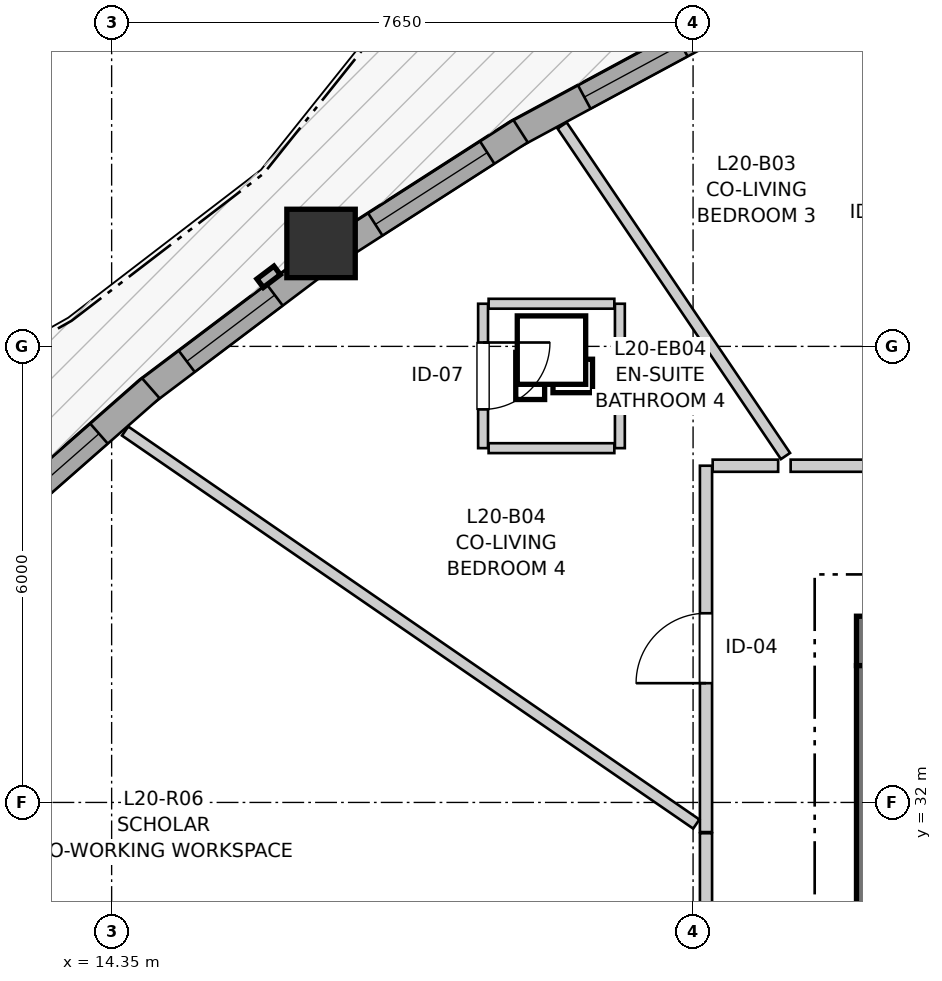
"""IFC4 building model, lengths in metres.
Left out: names, types, materials, properties, quantities, classifications, styles, units other than length and angle.
Written with IfcOpenShell. Run it as: python <this file> out.ifc"""

import sys

from ifc_helpers import new_model, si_unit, direction, frame, frame_2d, origin, origin_2d, place, context, subcontext, project, spatial, rectangle, extrude, source, transform, mapped, element, fill, save


model = new_model("IFC4")
c1 = context("Model", 3, precision=1e-05, world=origin(), true_north=direction((0.0, 1.0)))
c2 = subcontext(c1, "Body", "Model", "MODEL_VIEW")
j1 = project(units=[si_unit("LENGTHUNIT", "METRE"), si_unit("PLANEANGLEUNIT", "RADIAN")], contexts=[c1])
p1 = place(None, origin())
s1 = spatial("IfcSite", under=j1, at=p1, CompositionType="ELEMENT")
p2 = place(p1, origin())
s2 = spatial("IfcBuilding", under=s1, at=p2, CompositionType="ELEMENT")
p3 = place(p2, frame((0.0, 0.0, 70.4)))
s3 = spatial("IfcBuildingStorey", under=s2, at=p3, CompositionType="ELEMENT", Elevation=70.4)
p4 = place(p3, frame((36.55, 34.125, 0.0), z_axis=(0.0, 0.0, 1.0), x_axis=(-1.0, 0.0, 0.0)))
e1 = element("IfcWall", 1, at=p4, inside=s3, PredefinedType="SHEAR", context=c2, shape_type="SweptSolid", body=[
    extrude(rectangle(XDim=12.4, YDim=0.65, at=frame_2d((6.2, 0.0))), origin(), (0.0, 0.0, 1.0), 2.95),
])
p5 = place(p3, frame((24.475, 33.8, 0.0), z_axis=(0.0, 0.0, 1.0), x_axis=(0.0, -1.0, 0.0)))
e2 = element("IfcWall", 2, at=p5, inside=s3, PredefinedType="SHEAR", context=c2, shape_type="SweptSolid", body=[
    extrude(rectangle(XDim=15.6, YDim=0.65, at=frame_2d((7.8, 0.0))), origin(), (0.0, 0.0, 1.0), 2.95),
])
p6 = place(p5, frame((7.05, 0.0, 0.0)))
e3 = element("IfcOpeningElement", 3, at=p6, cuts=e2, PredefinedType="OPENING", context=c2, shape_type="SweptSolid", body=[
    extrude(rectangle(XDim=1.5, YDim=2.15, at=frame_2d((0.75, 1.075))), frame((0.0, 0.335, 0.0), z_axis=(0.0, -1.0, 0.0), x_axis=(1.0, 0.0, 0.0)), (0.0, 0.0, 1.0), 0.67),
])
p7 = place(p5, frame((3.52, 0.0, 0.0)))
e4 = element("IfcOpeningElement", 4, at=p7, cuts=e2, PredefinedType="OPENING", context=c2, shape_type="SweptSolid", body=[
    extrude(rectangle(XDim=0.86, YDim=2.05, at=frame_2d((0.43, 1.025))), frame((0.0, 0.335, 0.0), z_axis=(0.0, -1.0, 0.0), x_axis=(1.0, 0.0, 0.0)), (0.0, 0.0, 1.0), 0.67),
])
p8 = place(p5, frame((11.22, 0.0, 0.0)))
e5 = element("IfcOpeningElement", 5, at=p8, cuts=e2, PredefinedType="OPENING", context=c2, shape_type="SweptSolid", body=[
    extrude(rectangle(XDim=0.86, YDim=2.05, at=frame_2d((0.43, 1.025))), frame((0.0, 0.335, 0.0), z_axis=(0.0, -1.0, 0.0), x_axis=(1.0, 0.0, 0.0)), (0.0, 0.0, 1.0), 0.67),
])
m1 = source(origin(), c2, "Body", "SweptSolid", [
    extrude(rectangle(XDim=0.9, YDim=0.9, at=origin_2d()), origin(), (0.0, 0.0, 1.0), 2.95),
])
p9 = place(p3, frame((17.105, 39.354, 0.0), z_axis=(0.0, 0.0, 1.0), x_axis=(1.0, 0.0, 0.0)))
e6 = element("IfcColumn", 6, at=p9, inside=s3, PredefinedType="COLUMN", context=c2, shape_type="MappedRepresentation", body=[
    mapped(m1, transform((0.0, 0.0, 0.0), x_axis=(1.0, 0.0, 0.0), y_axis=(0.0, 1.0, 0.0), z_axis=(0.0, 0.0, 1.0), scale=1.0)),
])
p10 = place(p3, frame((22.282, 42.204, 0.0), z_axis=(0.0, 0.0, 1.0), x_axis=(-0.880100783756, -0.474786910553, 0.0)))
e7 = element("IfcWall", 7, at=p10, inside=s3, PredefinedType="SOLIDWALL", context=c2, shape_type="SweptSolid", body=[
    extrude(rectangle(XDim=2.987, YDim=0.35, at=frame_2d((1.494, 0.0))), origin(), (0.0, 0.0, 1.0), 2.48),
])
p11 = place(p10, frame((0.497, 0.0, 0.82)))
e8 = element("IfcOpeningElement", 8, at=p11, cuts=e7, PredefinedType="OPENING", context=c2, shape_type="SweptSolid", body=[
    extrude(rectangle(XDim=1.45, YDim=1.25, at=frame_2d((0.725, 0.625))), frame((0.0, 0.185, 0.0), z_axis=(0.0, -1.0, 0.0), x_axis=(1.0, 0.0, 0.0)), (0.0, 0.0, 1.0), 0.37),
])
p12 = place(p3, frame((19.73, 40.831, 0.0), z_axis=(0.0, 0.0, 1.0), x_axis=(-0.841577423868, -0.540136500929, 0.0)))
e9 = element("IfcWall", 9, at=p12, inside=s3, PredefinedType="SOLIDWALL", context=c2, shape_type="SweptSolid", body=[
    extrude(rectangle(XDim=2.782, YDim=0.35, at=frame_2d((1.391, 0.0))), origin(), (0.0, 0.0, 1.0), 2.48),
])
p13 = place(p12, frame((0.521, 0.0, 0.82)))
e10 = element("IfcOpeningElement", 10, at=p13, cuts=e9, PredefinedType="OPENING", context=c2, shape_type="SweptSolid", body=[
    extrude(rectangle(XDim=1.75, YDim=1.3, at=frame_2d((0.875, 0.65))), frame((0.0, 0.185, 0.0), z_axis=(0.0, -1.0, 0.0), x_axis=(1.0, 0.0, 0.0)), (0.0, 0.0, 1.0), 0.37),
])
p14 = place(p3, frame((17.031, 39.079, 0.0), z_axis=(0.0, 0.0, 1.0), x_axis=(-0.798385341516, -0.602146864521, 0.0)))
e11 = element("IfcWall", 11, at=p14, inside=s3, PredefinedType="SOLIDWALL", context=c2, shape_type="SweptSolid", body=[
    extrude(rectangle(XDim=2.799, YDim=0.35, at=frame_2d((1.4, 0.0))), origin(), (0.0, 0.0, 1.0), 2.48),
])
p15 = place(p14, frame((0.67, 0.0, 0.82)))
e12 = element("IfcOpeningElement", 12, at=p15, cuts=e11, PredefinedType="OPENING", context=c2, shape_type="SweptSolid", body=[
    extrude(rectangle(XDim=1.45, YDim=1.25, at=frame_2d((0.725, 0.625))), frame((0.0, 0.185, 0.0), z_axis=(0.0, -1.0, 0.0), x_axis=(1.0, 0.0, 0.0)), (0.0, 0.0, 1.0), 0.37),
])
p16 = place(p3, frame((14.865, 37.45, 0.0), z_axis=(0.0, 0.0, 1.0), x_axis=(-0.751505335107, -0.659727012715, 0.0)))
e13 = element("IfcWall", 13, at=p16, inside=s3, PredefinedType="SOLIDWALL", context=c2, shape_type="SweptSolid", body=[
    extrude(rectangle(XDim=3.038, YDim=0.35, at=frame_2d((1.519, 0.0))), origin(), (0.0, 0.0, 1.0), 2.48),
])
p17 = place(p16, frame((0.906, 0.0, 0.82)))
e14 = element("IfcOpeningElement", 14, at=p17, cuts=e13, PredefinedType="OPENING", context=c2, shape_type="SweptSolid", body=[
    extrude(rectangle(XDim=1.8, YDim=1.45, at=frame_2d((0.9, 0.725))), frame((0.0, 0.185, 0.0), z_axis=(0.0, -1.0, 0.0), x_axis=(1.0, 0.0, 0.0)), (0.0, 0.0, 1.0), 0.37),
])
p18 = place(p3, frame((23.284, 36.43, 0.0), z_axis=(0.0, 0.0, 1.0), x_axis=(1.0, 0.0, 0.0)))
e15 = element("IfcWall", 15, at=p18, inside=s3, PredefinedType="PARTITIONING", context=c2, shape_type="SweptSolid", body=[
    extrude(rectangle(XDim=4.845, YDim=0.16, at=frame_2d((2.422, 0.0))), origin(), (0.0, 0.0, 1.0), 2.588),
])
p19 = place(p18, frame((1.963, 0.0, 0.0)))
e16 = element("IfcOpeningElement", 16, at=p19, cuts=e15, PredefinedType="OPENING", context=c2, shape_type="SweptSolid", body=[
    extrude(rectangle(XDim=0.92, YDim=2.1, at=frame_2d((0.46, 1.05))), frame((0.0, 0.09, 0.0), z_axis=(0.0, -1.0, 0.0), x_axis=(1.0, 0.0, 0.0)), (0.0, 0.0, 1.0), 0.18),
])
p20 = place(p3, frame((22.17, 31.61, 0.0), z_axis=(0.0, 0.0, 1.0), x_axis=(0.0, 1.0, 0.0)))
e17 = element("IfcWall", 17, at=p20, inside=s3, PredefinedType="PARTITIONING", context=c2, shape_type="SweptSolid", body=[
    extrude(rectangle(XDim=4.82, YDim=0.16, at=frame_2d((2.41, 0.0))), origin(), (0.0, 0.0, 1.0), 2.95),
])
p21 = place(p20, frame((1.959, 0.0, 0.0)))
e18 = element("IfcOpeningElement", 18, at=p21, cuts=e17, PredefinedType="OPENING", context=c2, shape_type="SweptSolid", body=[
    extrude(rectangle(XDim=0.92, YDim=2.1, at=frame_2d((0.46, 1.05))), frame((0.0, 0.09, 0.0), z_axis=(0.0, -1.0, 0.0), x_axis=(1.0, 0.0, 0.0)), (0.0, 0.0, 1.0), 0.18),
])
p22 = place(p3, frame((22.17, 27.85, 0.0), z_axis=(0.0, 0.0, 1.0), x_axis=(0.0, 1.0, 0.0)))
e19 = element("IfcWall", 19, at=p22, inside=s3, PredefinedType="PARTITIONING", context=c2, shape_type="SweptSolid", body=[
    extrude(rectangle(XDim=3.745, YDim=0.16, at=frame_2d((1.873, 0.0))), origin(), (0.0, 0.0, 1.0), 2.95),
])
p23 = place(p22, frame((1.438, 0.0, 0.0)))
e20 = element("IfcOpeningElement", 20, at=p23, cuts=e19, PredefinedType="OPENING", context=c2, shape_type="SweptSolid", body=[
    extrude(rectangle(XDim=0.96, YDim=2.1, at=frame_2d((0.48, 1.05))), frame((0.0, 0.09, 0.0), z_axis=(0.0, -1.0, 0.0), x_axis=(1.0, 0.0, 0.0)), (0.0, 0.0, 1.0), 0.18),
])
p24 = place(p3, frame((19.237, 38.561, 0.0), z_axis=(0.0, 0.0, 1.0), x_axis=(0.0, -1.0, 0.0)))
e21 = element("IfcWall", 21, at=p24, inside=s3, PredefinedType="PARTITIONING", context=c2, shape_type="SweptSolid", body=[
    extrude(rectangle(XDim=1.9, YDim=0.13, at=frame_2d((0.95, 0.0))), origin(), (0.0, 0.0, 1.0), 2.95),
])
p25 = place(p24, frame((0.51, 0.0, 0.0)))
e22 = element("IfcOpeningElement", 22, at=p25, cuts=e21, PredefinedType="OPENING", context=c2, shape_type="SweptSolid", body=[
    extrude(rectangle(XDim=0.88, YDim=2.05, at=frame_2d((0.44, 1.025))), frame((0.0, 0.075, 0.0), z_axis=(0.0, -1.0, 0.0), x_axis=(1.0, 0.0, 0.0)), (0.0, 0.0, 1.0), 0.15),
])
p26 = place(p3, frame((14.527, 36.886, 0.0), z_axis=(0.0, 0.0, 1.0), x_axis=(0.823849772282, -0.566808215106, 0.0)))
e23 = element("IfcWall", 23, at=p26, inside=s3, PredefinedType="PARTITIONING", context=c2, shape_type="SweptSolid", body=[
    extrude(rectangle(XDim=9.122, YDim=0.145, at=frame_2d((4.561, 0.0))), origin(), (0.0, 0.0, 1.0), 2.95),
])
p27 = place(p3, frame((20.277, 40.906, 0.0), z_axis=(0.0, 0.0, 1.0), x_axis=(0.559905741259, -0.828556311246, 0.0)))
e24 = element("IfcWall", 24, at=p27, inside=s3, PredefinedType="PARTITIONING", context=c2, shape_type="SweptSolid", body=[
    extrude(rectangle(XDim=5.249, YDim=0.145, at=frame_2d((2.625, 0.0))), origin(), (0.0, 0.0, 1.0), 2.95),
])
p28 = place(p3, frame((21.037, 36.661, 0.0), z_axis=(0.0, 0.0, 1.0), x_axis=(0.0, 1.0, 0.0)))
e25 = element("IfcWall", 25, at=p28, inside=s3, PredefinedType="PARTITIONING", context=c2, shape_type="SweptSolid", body=[
    extrude(rectangle(XDim=1.9, YDim=0.13, at=frame_2d((0.95, 0.0))), origin(), (0.0, 0.0, 1.0), 2.95),
])
for number, where, z_axis, x_axis in (
    (26, (19.31, 38.561, 0.0), (0.0, 0.0, 1.0), (1.0, 0.0, 0.0)),
    (27, (19.31, 36.661, 0.0), (0.0, 0.0, 1.0), (1.0, 0.0, 0.0)),
):
    element("IfcWall", number, at=place(p3, frame(where, z_axis=z_axis, x_axis=x_axis)), inside=s3, PredefinedType="PARTITIONING", context=c2, shape_type="SweptSolid", body=[
        extrude(rectangle(XDim=1.654, YDim=0.13, at=frame_2d((0.827, 0.0))), origin(), (0.0, 0.0, 1.0), 2.95),
    ])
p29 = place(p3, frame((22.258, 36.43, 0.0), z_axis=(0.0, 0.0, 1.0), x_axis=(1.0, 0.0, 0.0)))
e28 = element("IfcWall", 28, at=p29, inside=s3, PredefinedType="PARTITIONING", context=c2, shape_type="SweptSolid", body=[
    extrude(rectangle(XDim=0.861, YDim=0.16, at=frame_2d((0.431, 0.0))), origin(), (0.0, 0.0, 1.0), 2.95),
])
m2 = source(origin(), c2, "Body", "SweptSolid", [
    extrude(rectangle(XDim=1.45, YDim=1.25, at=frame_2d((0.725, 0.625))), frame((0.0, 0.03, 0.0), z_axis=(0.0, -1.0, 0.0), x_axis=(1.0, 0.0, 0.0)), (0.0, 0.0, 1.0), 0.06),
])
p30 = place(p11, origin())
e29 = element("IfcWindow", 29, at=p30, inside=s3, PartitioningType="SINGLE_PANEL", PredefinedType="WINDOW", context=c2, shape_type="MappedRepresentation", body=[
    mapped(m2, transform((0.0, 0.0, 0.0), x_axis=(1.0, 0.0, 0.0), y_axis=(0.0, 1.0, 0.0), z_axis=(0.0, 0.0, 1.0), scale=1.0)),
])
fill(e8, e29)
m3 = source(origin(), c2, "Body", "SweptSolid", [
    extrude(rectangle(XDim=1.75, YDim=1.3, at=frame_2d((0.875, 0.65))), frame((0.0, 0.03, 0.0), z_axis=(0.0, -1.0, 0.0), x_axis=(1.0, 0.0, 0.0)), (0.0, 0.0, 1.0), 0.06),
])
p31 = place(p13, origin())
e30 = element("IfcWindow", 30, at=p31, inside=s3, PartitioningType="SINGLE_PANEL", PredefinedType="WINDOW", context=c2, shape_type="MappedRepresentation", body=[
    mapped(m3, transform((0.0, 0.0, 0.0), x_axis=(1.0, 0.0, 0.0), y_axis=(0.0, 1.0, 0.0), z_axis=(0.0, 0.0, 1.0), scale=1.0)),
])
fill(e10, e30)
p32 = place(p15, origin())
e31 = element("IfcWindow", 31, at=p32, inside=s3, PartitioningType="SINGLE_PANEL", PredefinedType="WINDOW", context=c2, shape_type="MappedRepresentation", body=[
    mapped(m2, transform((0.0, 0.0, 0.0), x_axis=(1.0, 0.0, 0.0), y_axis=(0.0, 1.0, 0.0), z_axis=(0.0, 0.0, 1.0), scale=1.0)),
])
fill(e12, e31)
m4 = source(origin(), c2, "Body", "SweptSolid", [
    extrude(rectangle(XDim=1.8, YDim=1.45, at=frame_2d((0.9, 0.725))), frame((0.0, 0.03, 0.0), z_axis=(0.0, -1.0, 0.0), x_axis=(1.0, 0.0, 0.0)), (0.0, 0.0, 1.0), 0.06),
])
p33 = place(p17, origin())
e32 = element("IfcWindow", 32, at=p33, inside=s3, PartitioningType="SINGLE_PANEL", PredefinedType="WINDOW", context=c2, shape_type="MappedRepresentation", body=[
    mapped(m4, transform((0.0, 0.0, 0.0), x_axis=(1.0, 0.0, 0.0), y_axis=(0.0, 1.0, 0.0), z_axis=(0.0, 0.0, 1.0), scale=1.0)),
])
fill(e14, e32)
m5 = source(origin(), c2, "Body", "SweptSolid", [
    extrude(rectangle(XDim=0.92, YDim=2.1, at=frame_2d((0.46, 1.05))), frame((0.0, 0.025, 0.0), z_axis=(0.0, -1.0, 0.0), x_axis=(1.0, 0.0, 0.0)), (0.0, 0.0, 1.0), 0.05),
])
p34 = place(p21, origin())
e33 = element("IfcDoor", 33, at=p34, inside=s3, OperationType="SINGLE_SWING_LEFT", PredefinedType="DOOR", context=c2, shape_type="MappedRepresentation", body=[
    mapped(m5, transform((0.0, 0.0, 0.0), x_axis=(1.0, 0.0, 0.0), y_axis=(0.0, 1.0, 0.0), z_axis=(0.0, 0.0, 1.0), scale=1.0)),
])
fill(e18, e33)
m6 = source(origin(), c2, "Body", "SweptSolid", [
    extrude(rectangle(XDim=0.88, YDim=2.05, at=frame_2d((0.44, 1.025))), frame((0.0, 0.025, 0.0), z_axis=(0.0, -1.0, 0.0), x_axis=(1.0, 0.0, 0.0)), (0.0, 0.0, 1.0), 0.05),
])
p35 = place(p25, origin())
e34 = element("IfcDoor", 34, at=p35, inside=s3, OperationType="SINGLE_SWING_LEFT", PredefinedType="DOOR", context=c2, shape_type="MappedRepresentation", body=[
    mapped(m6, transform((0.0, 0.0, 0.0), x_axis=(1.0, 0.0, 0.0), y_axis=(0.0, 1.0, 0.0), z_axis=(0.0, 0.0, 1.0), scale=1.0)),
])
fill(e22, e34)
save(model, sys.argv[1])
